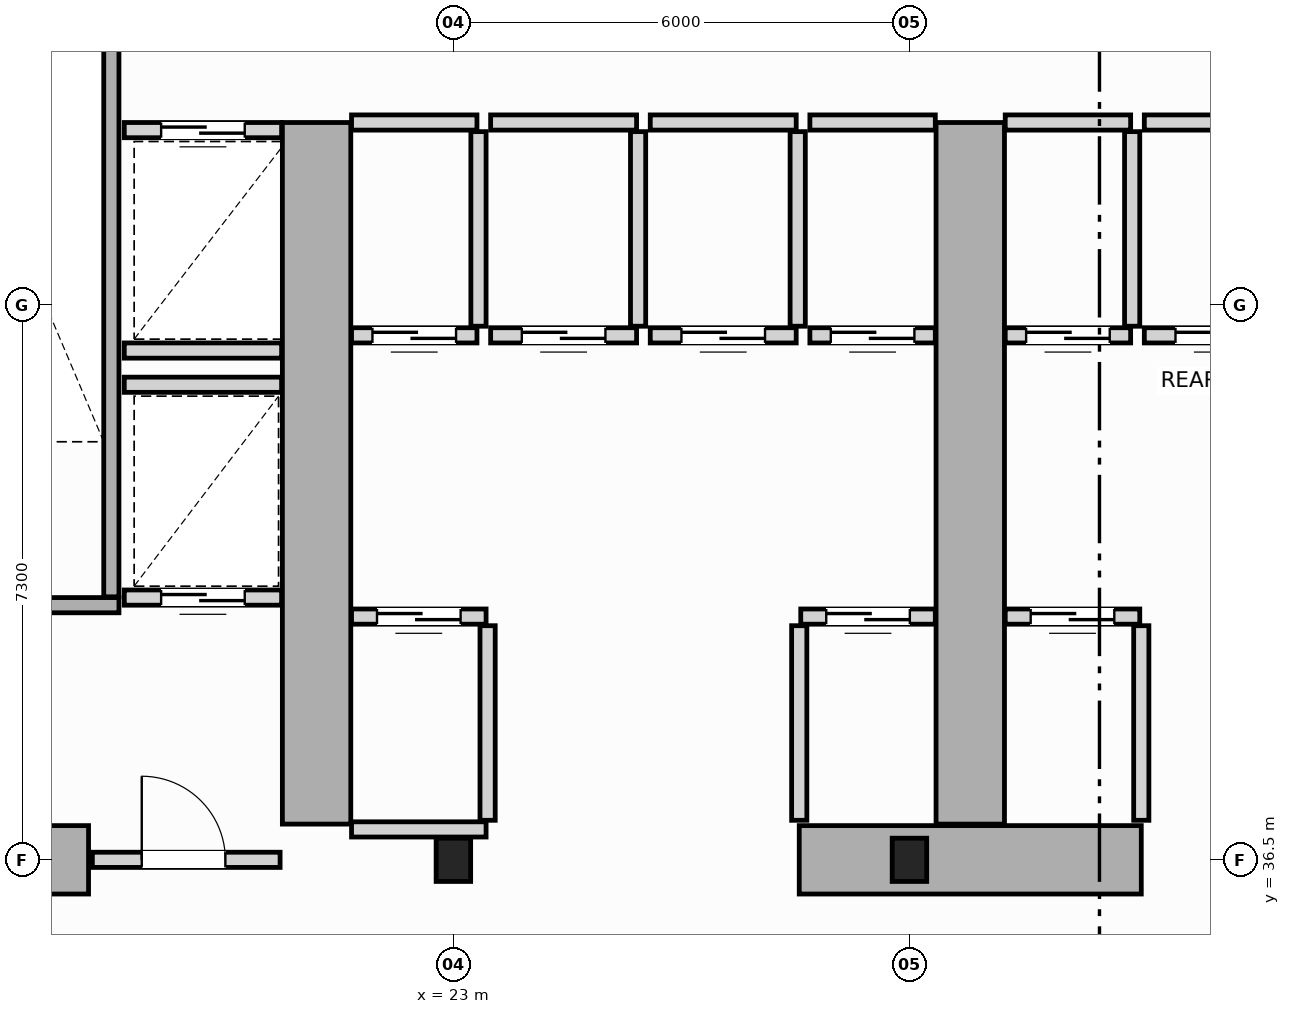
"""IFC4 building model, lengths in metres.
Left out: names, types, materials, properties, quantities, classifications, styles, units other than length and angle.
Written with IfcOpenShell. Run it as: python <this file> out.ifc"""

import sys

from ifc_helpers import new_model, si_unit, direction, frame, frame_2d, origin, origin_2d, place, context, subcontext, project, spatial, rectangle, i_section, extrude, source, transform, mapped, element, fill, save


model = new_model("IFC4")
c1 = context("Model", 3, precision=1e-05, world=origin(), true_north=direction((0.0, 1.0)))
c2 = subcontext(c1, "Body", "Model", "MODEL_VIEW")
j1 = project(units=[si_unit("LENGTHUNIT", "METRE"), si_unit("PLANEANGLEUNIT", "RADIAN")], contexts=[c1])
p1 = place(None, origin())
s1 = spatial("IfcSite", under=j1, at=p1, CompositionType="ELEMENT")
p2 = place(p1, origin())
s2 = spatial("IfcBuilding", under=s1, at=p2, CompositionType="ELEMENT")
p3 = place(p2, origin())
s3 = spatial("IfcBuildingStorey", under=s2, at=p3, CompositionType="ELEMENT", Elevation=0.0)
m1 = source(origin(), c2, "Body", "SweptSolid", [
    extrude(i_section(OverallWidth=0.454, OverallDepth=0.569, WebThickness=0.078, FlangeThickness=0.08, FilletRadius=0.015, at=origin_2d()), origin(), (0.0, 0.0, 1.0), 5.6),
])
for number, where, z_axis, x_axis in (
    (1, (23.0, 36.5, 0.0), (0.0, 0.0, 1.0), (1.0, 0.0, 0.0)),
    (2, (29.0, 36.5, 0.0), (0.0, 0.0, 1.0), (1.0, 0.0, 0.0)),
):
    element("IfcColumn", number, at=place(p3, frame(where, z_axis=z_axis, x_axis=x_axis)), inside=s3, PredefinedType="COLUMN", context=c2, shape_type="MappedRepresentation", body=[
        mapped(m1, transform((0.0, 0.0, 0.0), scale=1.0)),
    ])
p4 = place(p3, frame((14.47, 36.5, 0.0), z_axis=(0.0, 0.0, 1.0), x_axis=(1.0, 0.0, 0.0)))
e3 = element("IfcWall", 3, at=p4, inside=s3, PredefinedType="SHEAR", context=c2, shape_type="SweptSolid", body=[
    extrude(rectangle(XDim=3.73, YDim=0.9, at=frame_2d((1.865, 0.0))), origin(), (0.0, 0.0, 1.0), 4.12),
])
p5 = place(p3, frame((27.55, 36.5, 0.0), z_axis=(0.0, 0.0, 1.0), x_axis=(1.0, 0.0, 0.0)))
e4 = element("IfcWall", 4, at=p5, inside=s3, PredefinedType="SHEAR", context=c2, shape_type="SweptSolid", body=[
    extrude(rectangle(XDim=4.5, YDim=0.9, at=frame_2d((2.25, 0.0))), origin(), (0.0, 0.0, 1.0), 5.6),
])
for number, where, z_axis, x_axis in (
    (5, (21.2, 36.97, 0.0), (0.0, 0.0, 1.0), (0.0, 1.0, 0.0)),
    (6, (29.8, 36.97, 0.0), (0.0, 0.0, 1.0), (0.0, 1.0, 0.0)),
):
    element("IfcWall", number, at=place(p3, frame(where, z_axis=z_axis, x_axis=x_axis)), inside=s3, PredefinedType="SHEAR", context=c2, shape_type="SweptSolid", body=[
        extrude(rectangle(XDim=9.23, YDim=0.9, at=frame_2d((4.615, 0.0))), origin(), (0.0, 0.0, 1.0), 5.6),
    ])
p6 = place(p3, frame((14.45, 39.85, 0.0), z_axis=(0.0, 0.0, 1.0), x_axis=(1.0, 0.0, 0.0)))
e7 = element("IfcWall", 7, at=p6, inside=s3, PredefinedType="SOLIDWALL", context=c2, shape_type="SweptSolid", body=[
    extrude(rectangle(XDim=4.15, YDim=0.2, at=frame_2d((2.075, 0.0))), origin(), (0.0, 0.0, 1.0), 5.6),
])
p7 = place(p6, frame((1.725, 0.0, 0.0)))
e8 = element("IfcOpeningElement", 8, at=p7, cuts=e7, PredefinedType="OPENING", context=c2, shape_type="SweptSolid", body=[
    extrude(rectangle(XDim=1.1, YDim=2.15, at=frame_2d((0.55, 1.075))), frame((0.0, 0.11, 0.0), z_axis=(0.0, -1.0, 0.0), x_axis=(1.0, 0.0, 0.0)), (0.0, 0.0, 1.0), 0.22),
])
p8 = place(p3, frame((18.5, 39.96, 0.0), z_axis=(0.0, 0.0, 1.0), x_axis=(0.0, 1.0, 0.0)))
e9 = element("IfcWall", 9, at=p8, inside=s3, PredefinedType="SOLIDWALL", context=c2, shape_type="SweptSolid", body=[
    extrude(rectangle(XDim=9.93, YDim=0.2, at=frame_2d((4.965, 0.0))), origin(), (0.0, 0.0, 1.0), 5.6),
])
p9 = place(p3, frame((18.25, 36.5, 0.0), z_axis=(0.0, 0.0, 1.0), x_axis=(1.0, 0.0, 0.0)))
e10 = element("IfcWall", 10, at=p9, inside=s3, PredefinedType="SOLIDWALL", context=c2, shape_type="SweptSolid", body=[
    extrude(rectangle(XDim=2.47, YDim=0.2, at=frame_2d((1.235, 0.0))), origin(), (0.0, 0.0, 1.0), 4.11),
])
p10 = place(p9, frame((0.65, 0.0, 0.0)))
e11 = element("IfcOpeningElement", 11, at=p10, cuts=e10, PredefinedType="OPENING", context=c2, shape_type="SweptSolid", body=[
    extrude(rectangle(XDim=1.1, YDim=2.15, at=frame_2d((0.55, 1.075))), frame((0.0, 0.11, 0.0), z_axis=(0.0, -1.0, 0.0), x_axis=(1.0, 0.0, 0.0)), (0.0, 0.0, 1.0), 0.22),
])
p11 = place(p3, frame((21.66, 39.7, 0.0), z_axis=(0.0, 0.0, 1.0), x_axis=(1.0, 0.0, 0.0)))
e12 = element("IfcWall", 12, at=p11, inside=s3, PredefinedType="SOLIDWALL", context=c2, shape_type="SweptSolid", body=[
    extrude(rectangle(XDim=1.77, YDim=0.2, at=frame_2d((0.885, 0.0))), origin(), (0.0, 0.0, 1.0), 5.32),
])
p12 = place(p11, frame((0.335, 0.0, 0.0)))
e13 = element("IfcOpeningElement", 13, at=p12, cuts=e12, PredefinedType="OPENING", context=c2, shape_type="SweptSolid", body=[
    extrude(rectangle(XDim=1.1, YDim=2.15, at=frame_2d((0.55, 1.075))), frame((0.0, 0.11, 0.0), z_axis=(0.0, -1.0, 0.0), x_axis=(1.0, 0.0, 0.0)), (0.0, 0.0, 1.0), 0.22),
])
p13 = place(p3, frame((21.66, 36.9, 0.0), z_axis=(0.0, 0.0, 1.0), x_axis=(1.0, 0.0, 0.0)))
e14 = element("IfcWall", 14, at=p13, inside=s3, PredefinedType="SOLIDWALL", context=c2, shape_type="SweptSolid", body=[
    extrude(rectangle(XDim=1.77, YDim=0.2, at=frame_2d((0.885, 0.0))), origin(), (0.0, 0.0, 1.0), 4.11),
])
p14 = place(p3, frame((23.45, 37.02, 0.0), z_axis=(0.0, 0.0, 1.0), x_axis=(0.0, 1.0, 0.0)))
e15 = element("IfcWall", 15, at=p14, inside=s3, PredefinedType="SOLIDWALL", context=c2, shape_type="SweptSolid", body=[
    extrude(rectangle(XDim=2.56, YDim=0.2, at=frame_2d((1.28, 0.0))), origin(), (0.0, 0.0, 1.0), 5.32),
])
p15 = place(p3, frame((27.57, 39.7, 0.0), z_axis=(0.0, 0.0, 1.0), x_axis=(1.0, 0.0, 0.0)))
e16 = element("IfcWall", 16, at=p15, inside=s3, PredefinedType="SOLIDWALL", context=c2, shape_type="SweptSolid", body=[
    extrude(rectangle(XDim=1.77, YDim=0.2, at=frame_2d((0.885, 0.0))), origin(), (0.0, 0.0, 1.0), 5.32),
])
p16 = place(p15, frame((0.335, 0.0, 0.0)))
e17 = element("IfcOpeningElement", 17, at=p16, cuts=e16, PredefinedType="OPENING", context=c2, shape_type="SweptSolid", body=[
    extrude(rectangle(XDim=1.1, YDim=2.15, at=frame_2d((0.55, 1.075))), frame((0.0, 0.11, 0.0), z_axis=(0.0, -1.0, 0.0), x_axis=(1.0, 0.0, 0.0)), (0.0, 0.0, 1.0), 0.22),
])
p17 = place(p3, frame((27.55, 37.02, 0.0), z_axis=(0.0, 0.0, 1.0), x_axis=(0.0, 1.0, 0.0)))
e18 = element("IfcWall", 18, at=p17, inside=s3, PredefinedType="SOLIDWALL", context=c2, shape_type="SweptSolid", body=[
    extrude(rectangle(XDim=2.56, YDim=0.2, at=frame_2d((1.28, 0.0))), origin(), (0.0, 0.0, 1.0), 5.32),
])
p18 = place(p3, frame((21.66, 43.4, 0.0), z_axis=(0.0, 0.0, 1.0), x_axis=(1.0, 0.0, 0.0)))
e19 = element("IfcWall", 19, at=p18, inside=s3, PredefinedType="SOLIDWALL", context=c2, shape_type="SweptSolid", body=[
    extrude(rectangle(XDim=1.65, YDim=0.2, at=frame_2d((0.825, 0.0))), origin(), (0.0, 0.0, 1.0), 5.32),
])
p19 = place(p18, frame((0.275, 0.0, 0.0)))
e20 = element("IfcOpeningElement", 20, at=p19, cuts=e19, PredefinedType="OPENING", context=c2, shape_type="SweptSolid", body=[
    extrude(rectangle(XDim=1.1, YDim=2.15, at=frame_2d((0.55, 1.075))), frame((0.0, 0.11, 0.0), z_axis=(0.0, -1.0, 0.0), x_axis=(1.0, 0.0, 0.0)), (0.0, 0.0, 1.0), 0.22),
])
p20 = place(p3, frame((21.66, 46.2, 0.0), z_axis=(0.0, 0.0, 1.0), x_axis=(1.0, 0.0, 0.0)))
e21 = element("IfcWall", 21, at=p20, inside=s3, PredefinedType="SOLIDWALL", context=c2, shape_type="SweptSolid", body=[
    extrude(rectangle(XDim=1.65, YDim=0.2, at=frame_2d((0.825, 0.0))), origin(), (0.0, 0.0, 1.0), 5.32),
])
p21 = place(p3, frame((23.33, 43.52, 0.0), z_axis=(0.0, 0.0, 1.0), x_axis=(0.0, 1.0, 0.0)))
e22 = element("IfcWall", 22, at=p21, inside=s3, PredefinedType="SOLIDWALL", context=c2, shape_type="SweptSolid", body=[
    extrude(rectangle(XDim=2.56, YDim=0.2, at=frame_2d((1.28, 0.0))), origin(), (0.0, 0.0, 1.0), 5.32),
])
p22 = place(p3, frame((23.49, 43.4, 0.0), z_axis=(0.0, 0.0, 1.0), x_axis=(1.0, 0.0, 0.0)))
e23 = element("IfcWall", 23, at=p22, inside=s3, PredefinedType="SOLIDWALL", context=c2, shape_type="SweptSolid", body=[
    extrude(rectangle(XDim=1.92, YDim=0.2, at=frame_2d((0.96, 0.0))), origin(), (0.0, 0.0, 1.0), 5.32),
])
p23 = place(p22, frame((0.41, 0.0, 0.0)))
e24 = element("IfcOpeningElement", 24, at=p23, cuts=e23, PredefinedType="OPENING", context=c2, shape_type="SweptSolid", body=[
    extrude(rectangle(XDim=1.1, YDim=2.15, at=frame_2d((0.55, 1.075))), frame((0.0, 0.11, 0.0), z_axis=(0.0, -1.0, 0.0), x_axis=(1.0, 0.0, 0.0)), (0.0, 0.0, 1.0), 0.22),
])
p24 = place(p3, frame((23.49, 46.2, 0.0), z_axis=(0.0, 0.0, 1.0), x_axis=(1.0, 0.0, 0.0)))
e25 = element("IfcWall", 25, at=p24, inside=s3, PredefinedType="SOLIDWALL", context=c2, shape_type="SweptSolid", body=[
    extrude(rectangle(XDim=1.92, YDim=0.2, at=frame_2d((0.96, 0.0))), origin(), (0.0, 0.0, 1.0), 5.32),
])
p25 = place(p3, frame((25.43, 43.52, 0.0), z_axis=(0.0, 0.0, 1.0), x_axis=(0.0, 1.0, 0.0)))
e26 = element("IfcWall", 26, at=p25, inside=s3, PredefinedType="SOLIDWALL", context=c2, shape_type="SweptSolid", body=[
    extrude(rectangle(XDim=2.56, YDim=0.2, at=frame_2d((1.28, 0.0))), origin(), (0.0, 0.0, 1.0), 5.32),
])
p26 = place(p3, frame((25.59, 43.4, 0.0), z_axis=(0.0, 0.0, 1.0), x_axis=(1.0, 0.0, 0.0)))
e27 = element("IfcWall", 27, at=p26, inside=s3, PredefinedType="SOLIDWALL", context=c2, shape_type="SweptSolid", body=[
    extrude(rectangle(XDim=1.92, YDim=0.2, at=frame_2d((0.96, 0.0))), origin(), (0.0, 0.0, 1.0), 5.32),
])
p27 = place(p26, frame((0.41, 0.0, 0.0)))
e28 = element("IfcOpeningElement", 28, at=p27, cuts=e27, PredefinedType="OPENING", context=c2, shape_type="SweptSolid", body=[
    extrude(rectangle(XDim=1.1, YDim=2.15, at=frame_2d((0.55, 1.075))), frame((0.0, 0.11, 0.0), z_axis=(0.0, -1.0, 0.0), x_axis=(1.0, 0.0, 0.0)), (0.0, 0.0, 1.0), 0.22),
])
p28 = place(p3, frame((25.59, 46.2, 0.0), z_axis=(0.0, 0.0, 1.0), x_axis=(1.0, 0.0, 0.0)))
e29 = element("IfcWall", 29, at=p28, inside=s3, PredefinedType="SOLIDWALL", context=c2, shape_type="SweptSolid", body=[
    extrude(rectangle(XDim=1.92, YDim=0.2, at=frame_2d((0.96, 0.0))), origin(), (0.0, 0.0, 1.0), 5.32),
])
p29 = place(p3, frame((27.53, 43.52, 0.0), z_axis=(0.0, 0.0, 1.0), x_axis=(0.0, 1.0, 0.0)))
e30 = element("IfcWall", 30, at=p29, inside=s3, PredefinedType="SOLIDWALL", context=c2, shape_type="SweptSolid", body=[
    extrude(rectangle(XDim=2.56, YDim=0.2, at=frame_2d((1.28, 0.0))), origin(), (0.0, 0.0, 1.0), 5.32),
])
p30 = place(p3, frame((27.69, 43.4, 0.0), z_axis=(0.0, 0.0, 1.0), x_axis=(1.0, 0.0, 0.0)))
e31 = element("IfcWall", 31, at=p30, inside=s3, PredefinedType="SOLIDWALL", context=c2, shape_type="SweptSolid", body=[
    extrude(rectangle(XDim=1.65, YDim=0.2, at=frame_2d((0.825, 0.0))), origin(), (0.0, 0.0, 1.0), 5.32),
])
p31 = place(p30, frame((0.275, 0.0, 0.0)))
e32 = element("IfcOpeningElement", 32, at=p31, cuts=e31, PredefinedType="OPENING", context=c2, shape_type="SweptSolid", body=[
    extrude(rectangle(XDim=1.1, YDim=2.15, at=frame_2d((0.55, 1.075))), frame((0.0, 0.11, 0.0), z_axis=(0.0, -1.0, 0.0), x_axis=(1.0, 0.0, 0.0)), (0.0, 0.0, 1.0), 0.22),
])
p32 = place(p3, frame((27.69, 46.2, 0.0), z_axis=(0.0, 0.0, 1.0), x_axis=(1.0, 0.0, 0.0)))
e33 = element("IfcWall", 33, at=p32, inside=s3, PredefinedType="SOLIDWALL", context=c2, shape_type="SweptSolid", body=[
    extrude(rectangle(XDim=1.65, YDim=0.2, at=frame_2d((0.825, 0.0))), origin(), (0.0, 0.0, 1.0), 5.32),
])
p33 = place(p3, frame((30.26, 39.7, 0.0), z_axis=(0.0, 0.0, 1.0), x_axis=(1.0, 0.0, 0.0)))
e34 = element("IfcWall", 34, at=p33, inside=s3, PredefinedType="SOLIDWALL", context=c2, shape_type="SweptSolid", body=[
    extrude(rectangle(XDim=1.77, YDim=0.2, at=frame_2d((0.885, 0.0))), origin(), (0.0, 0.0, 1.0), 5.32),
])
p34 = place(p33, frame((0.335, 0.0, 0.0)))
e35 = element("IfcOpeningElement", 35, at=p34, cuts=e34, PredefinedType="OPENING", context=c2, shape_type="SweptSolid", body=[
    extrude(rectangle(XDim=1.1, YDim=2.15, at=frame_2d((0.55, 1.075))), frame((0.0, 0.11, 0.0), z_axis=(0.0, -1.0, 0.0), x_axis=(1.0, 0.0, 0.0)), (0.0, 0.0, 1.0), 0.22),
])
p35 = place(p3, frame((32.05, 37.02, 0.0), z_axis=(0.0, 0.0, 1.0), x_axis=(0.0, 1.0, 0.0)))
e36 = element("IfcWall", 36, at=p35, inside=s3, PredefinedType="SOLIDWALL", context=c2, shape_type="SweptSolid", body=[
    extrude(rectangle(XDim=2.56, YDim=0.2, at=frame_2d((1.28, 0.0))), origin(), (0.0, 0.0, 1.0), 5.32),
])
p36 = place(p3, frame((30.26, 43.4, 0.0), z_axis=(0.0, 0.0, 1.0), x_axis=(1.0, 0.0, 0.0)))
e37 = element("IfcWall", 37, at=p36, inside=s3, PredefinedType="SOLIDWALL", context=c2, shape_type="SweptSolid", body=[
    extrude(rectangle(XDim=1.65, YDim=0.2, at=frame_2d((0.825, 0.0))), origin(), (0.0, 0.0, 1.0), 5.32),
])
p37 = place(p36, frame((0.275, 0.0, 0.0)))
e38 = element("IfcOpeningElement", 38, at=p37, cuts=e37, PredefinedType="OPENING", context=c2, shape_type="SweptSolid", body=[
    extrude(rectangle(XDim=1.1, YDim=2.15, at=frame_2d((0.55, 1.075))), frame((0.0, 0.11, 0.0), z_axis=(0.0, -1.0, 0.0), x_axis=(1.0, 0.0, 0.0)), (0.0, 0.0, 1.0), 0.22),
])
p38 = place(p3, frame((30.26, 46.2, 0.0), z_axis=(0.0, 0.0, 1.0), x_axis=(1.0, 0.0, 0.0)))
e39 = element("IfcWall", 39, at=p38, inside=s3, PredefinedType="SOLIDWALL", context=c2, shape_type="SweptSolid", body=[
    extrude(rectangle(XDim=1.65, YDim=0.2, at=frame_2d((0.825, 0.0))), origin(), (0.0, 0.0, 1.0), 5.32),
])
p39 = place(p3, frame((31.93, 43.52, 0.0), z_axis=(0.0, 0.0, 1.0), x_axis=(0.0, 1.0, 0.0)))
e40 = element("IfcWall", 40, at=p39, inside=s3, PredefinedType="SOLIDWALL", context=c2, shape_type="SweptSolid", body=[
    extrude(rectangle(XDim=2.56, YDim=0.2, at=frame_2d((1.28, 0.0))), origin(), (0.0, 0.0, 1.0), 5.32),
])
p40 = place(p3, frame((32.09, 43.4, 0.0), z_axis=(0.0, 0.0, 1.0), x_axis=(1.0, 0.0, 0.0)))
e41 = element("IfcWall", 41, at=p40, inside=s3, PredefinedType="SOLIDWALL", context=c2, shape_type="SweptSolid", body=[
    extrude(rectangle(XDim=1.92, YDim=0.2, at=frame_2d((0.96, 0.0))), origin(), (0.0, 0.0, 1.0), 5.32),
])
p41 = place(p40, frame((0.41, 0.0, 0.0)))
e42 = element("IfcOpeningElement", 42, at=p41, cuts=e41, PredefinedType="OPENING", context=c2, shape_type="SweptSolid", body=[
    extrude(rectangle(XDim=1.1, YDim=2.15, at=frame_2d((0.55, 1.075))), frame((0.0, 0.11, 0.0), z_axis=(0.0, -1.0, 0.0), x_axis=(1.0, 0.0, 0.0)), (0.0, 0.0, 1.0), 0.22),
])
p42 = place(p3, frame((32.09, 46.2, 0.0), z_axis=(0.0, 0.0, 1.0), x_axis=(1.0, 0.0, 0.0)))
e43 = element("IfcWall", 43, at=p42, inside=s3, PredefinedType="SOLIDWALL", context=c2, shape_type="SweptSolid", body=[
    extrude(rectangle(XDim=1.92, YDim=0.2, at=frame_2d((0.96, 0.0))), origin(), (0.0, 0.0, 1.0), 5.32),
])
p43 = place(p3, frame((18.67, 46.1, 0.0), z_axis=(0.0, 0.0, 1.0), x_axis=(1.0, 0.0, 0.0)))
e44 = element("IfcWall", 44, at=p43, inside=s3, PredefinedType="SOLIDWALL", context=c2, shape_type="SweptSolid", body=[
    extrude(rectangle(XDim=2.07, YDim=0.2, at=frame_2d((1.035, 0.0))), origin(), (0.0, 0.0, 1.0), 5.32),
])
p44 = place(p43, frame((0.485, 0.0, 0.0)))
e45 = element("IfcOpeningElement", 45, at=p44, cuts=e44, PredefinedType="OPENING", context=c2, shape_type="SweptSolid", body=[
    extrude(rectangle(XDim=1.1, YDim=2.15, at=frame_2d((0.55, 1.075))), frame((0.0, 0.11, 0.0), z_axis=(0.0, -1.0, 0.0), x_axis=(1.0, 0.0, 0.0)), (0.0, 0.0, 1.0), 0.22),
])
p45 = place(p3, frame((18.67, 43.2, 0.0), z_axis=(0.0, 0.0, 1.0), x_axis=(1.0, 0.0, 0.0)))
e46 = element("IfcWall", 46, at=p45, inside=s3, PredefinedType="SOLIDWALL", context=c2, shape_type="SweptSolid", body=[
    extrude(rectangle(XDim=2.07, YDim=0.2, at=frame_2d((1.035, 0.0))), origin(), (0.0, 0.0, 1.0), 5.32),
])
p46 = place(p3, frame((18.67, 39.95, 0.0), z_axis=(0.0, 0.0, 1.0), x_axis=(1.0, 0.0, 0.0)))
e47 = element("IfcWall", 47, at=p46, inside=s3, PredefinedType="SOLIDWALL", context=c2, shape_type="SweptSolid", body=[
    extrude(rectangle(XDim=2.07, YDim=0.2, at=frame_2d((1.035, 0.0))), origin(), (0.0, 0.0, 1.0), 5.32),
])
p47 = place(p46, frame((0.485, 0.0, 0.0)))
e48 = element("IfcOpeningElement", 48, at=p47, cuts=e47, PredefinedType="OPENING", context=c2, shape_type="SweptSolid", body=[
    extrude(rectangle(XDim=1.1, YDim=2.15, at=frame_2d((0.55, 1.075))), frame((0.0, 0.11, 0.0), z_axis=(0.0, -1.0, 0.0), x_axis=(1.0, 0.0, 0.0)), (0.0, 0.0, 1.0), 0.22),
])
p48 = place(p3, frame((18.67, 42.75, 0.0), z_axis=(0.0, 0.0, 1.0), x_axis=(1.0, 0.0, 0.0)))
e49 = element("IfcWall", 49, at=p48, inside=s3, PredefinedType="SOLIDWALL", context=c2, shape_type="SweptSolid", body=[
    extrude(rectangle(XDim=2.07, YDim=0.2, at=frame_2d((1.035, 0.0))), origin(), (0.0, 0.0, 1.0), 5.32),
])
m2 = source(origin(), c2, "Body", "SweptSolid", [
    extrude(rectangle(XDim=1.1, YDim=2.15, at=frame_2d((0.55, 1.075))), frame((0.0, 0.025, 0.0), z_axis=(0.0, -1.0, 0.0), x_axis=(1.0, 0.0, 0.0)), (0.0, 0.0, 1.0), 0.05),
])
p49 = place(p10, origin())
e50 = element("IfcDoor", 50, at=p49, inside=s3, OperationType="SINGLE_SWING_RIGHT", PredefinedType="DOOR", context=c2, shape_type="MappedRepresentation", body=[
    mapped(m2, transform((0.0, 0.0, 0.0), scale=1.0)),
])
fill(e11, e50)
p50 = place(p12, origin())
e51 = element("IfcDoor", 51, at=p50, inside=s3, OperationType="DOUBLE_DOOR_SLIDING", PredefinedType="DOOR", context=c2, shape_type="MappedRepresentation", body=[
    mapped(m2, transform((0.0, 0.0, 0.0), scale=1.0)),
])
fill(e13, e51)
p51 = place(p16, origin())
e52 = element("IfcDoor", 52, at=p51, inside=s3, OperationType="DOUBLE_DOOR_SLIDING", PredefinedType="DOOR", context=c2, shape_type="MappedRepresentation", body=[
    mapped(m2, transform((0.0, 0.0, 0.0), scale=1.0)),
])
fill(e17, e52)
p52 = place(p19, origin())
e53 = element("IfcDoor", 53, at=p52, inside=s3, OperationType="DOUBLE_DOOR_SLIDING", PredefinedType="DOOR", context=c2, shape_type="MappedRepresentation", body=[
    mapped(m2, transform((0.0, 0.0, 0.0), scale=1.0)),
])
fill(e20, e53)
p53 = place(p23, origin())
e54 = element("IfcDoor", 54, at=p53, inside=s3, OperationType="DOUBLE_DOOR_SLIDING", PredefinedType="DOOR", context=c2, shape_type="MappedRepresentation", body=[
    mapped(m2, transform((0.0, 0.0, 0.0), scale=1.0)),
])
fill(e24, e54)
p54 = place(p27, origin())
e55 = element("IfcDoor", 55, at=p54, inside=s3, OperationType="DOUBLE_DOOR_SLIDING", PredefinedType="DOOR", context=c2, shape_type="MappedRepresentation", body=[
    mapped(m2, transform((0.0, 0.0, 0.0), scale=1.0)),
])
fill(e28, e55)
p55 = place(p31, origin())
e56 = element("IfcDoor", 56, at=p55, inside=s3, OperationType="DOUBLE_DOOR_SLIDING", PredefinedType="DOOR", context=c2, shape_type="MappedRepresentation", body=[
    mapped(m2, transform((0.0, 0.0, 0.0), scale=1.0)),
])
fill(e32, e56)
p56 = place(p34, origin())
e57 = element("IfcDoor", 57, at=p56, inside=s3, OperationType="DOUBLE_DOOR_SLIDING", PredefinedType="DOOR", context=c2, shape_type="MappedRepresentation", body=[
    mapped(m2, transform((0.0, 0.0, 0.0), scale=1.0)),
])
fill(e35, e57)
p57 = place(p37, origin())
e58 = element("IfcDoor", 58, at=p57, inside=s3, OperationType="DOUBLE_DOOR_SLIDING", PredefinedType="DOOR", context=c2, shape_type="MappedRepresentation", body=[
    mapped(m2, transform((0.0, 0.0, 0.0), scale=1.0)),
])
fill(e38, e58)
p58 = place(p41, origin())
e59 = element("IfcDoor", 59, at=p58, inside=s3, OperationType="DOUBLE_DOOR_SLIDING", PredefinedType="DOOR", context=c2, shape_type="MappedRepresentation", body=[
    mapped(m2, transform((0.0, 0.0, 0.0), scale=1.0)),
])
fill(e42, e59)
p59 = place(p44, origin())
e60 = element("IfcDoor", 60, at=p59, inside=s3, OperationType="DOUBLE_DOOR_SLIDING", PredefinedType="DOOR", context=c2, shape_type="MappedRepresentation", body=[
    mapped(m2, transform((0.0, 0.0, 0.0), scale=1.0)),
])
fill(e45, e60)
p60 = place(p47, origin())
e61 = element("IfcDoor", 61, at=p60, inside=s3, OperationType="DOUBLE_DOOR_SLIDING", PredefinedType="DOOR", context=c2, shape_type="MappedRepresentation", body=[
    mapped(m2, transform((0.0, 0.0, 0.0), scale=1.0)),
])
fill(e48, e61)
save(model, sys.argv[1])
